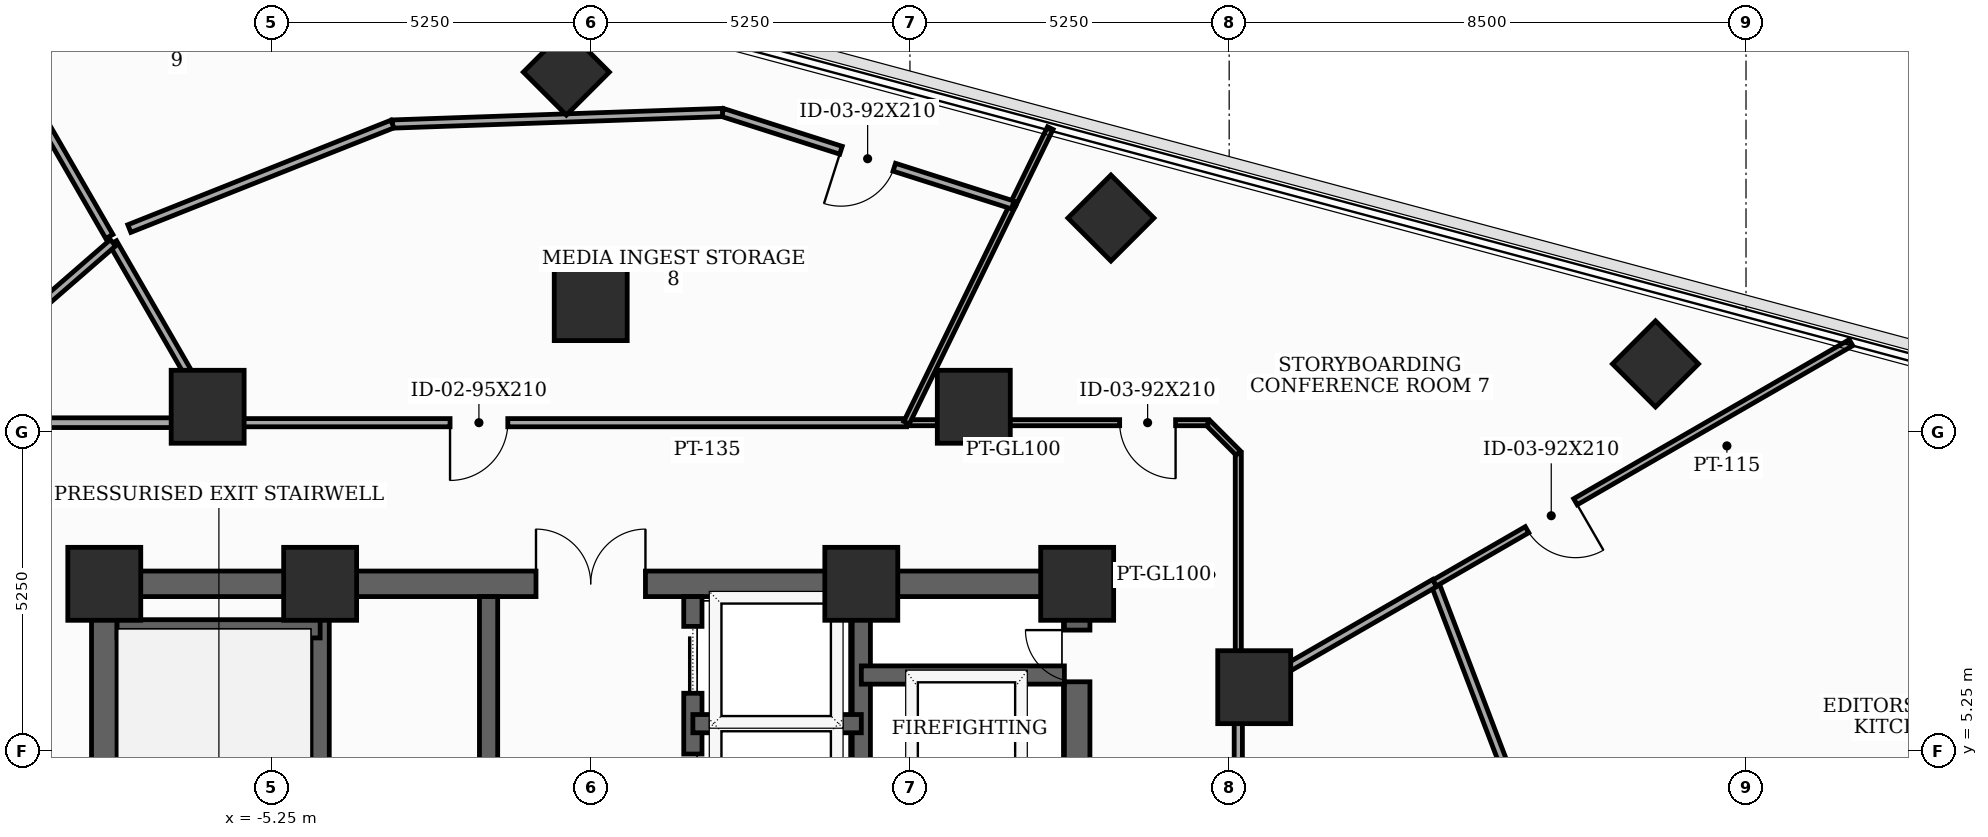
"""IFC4 building model, lengths in metres.
Left out: names, types, materials, properties, quantities, classifications, styles, units other than length and angle.
Written with IfcOpenShell. Run it as: python <this file> out.ifc"""

import sys

from ifc_helpers import new_model, si_unit, direction, frame, frame_2d, origin, origin_2d, place, context, subcontext, project, spatial, rectangle, extrude, element, fill, save


model = new_model("IFC4")
c1 = context("Model", 3, precision=1e-05, world=origin(), true_north=direction((0.0, 1.0)))
c2 = subcontext(c1, "Body", "Model", "MODEL_VIEW")
j1 = project(units=[si_unit("LENGTHUNIT", "METRE"), si_unit("PLANEANGLEUNIT", "RADIAN")], contexts=[c1])
p1 = place(None, origin())
s1 = spatial("IfcSite", under=j1, at=p1, CompositionType="ELEMENT")
p2 = place(p1, origin())
s2 = spatial("IfcBuilding", under=s1, at=p2, CompositionType="ELEMENT")
p3 = place(p2, frame((0.0, 0.0, 206.4)))
s3 = spatial("IfcBuildingStorey", under=s2, at=p3, CompositionType="ELEMENT", Elevation=206.4)
for number, where, z_axis, x_axis in (
    (1, (8.0, 8.0, 0.0), (0.0, 0.0, 1.0), (1.0, 0.0, 0.0)),
    (2, (4.45, 8.0, 0.0), (0.0, 0.0, 1.0), (1.0, 0.0, 0.0)),
    (3, (-4.45, 8.0, 0.0), (0.0, 0.0, 1.0), (1.0, 0.0, 0.0)),
    (4, (-8.0, 8.0, 0.0), (0.0, 0.0, 1.0), (1.0, 0.0, 0.0)),
    (5, (10.912, 6.3, 0.0), (0.0, 0.0, 1.0), (1.0, 0.0, 0.0)),
    (6, (6.3, 10.912, 0.0), (0.0, 0.0, 1.0), (1.0, 0.0, 0.0)),
    (7, (0.0, 12.6, 0.0), (0.0, 0.0, 1.0), (1.0, 0.0, 0.0)),
    (8, (-6.3, 10.912, 0.0), (0.0, 0.0, 1.0), (1.0, 0.0, 0.0)),
):
    element("IfcColumn", number, at=place(p3, frame(where, z_axis=z_axis, x_axis=x_axis)), inside=s3, PredefinedType="COLUMN", context=c2, shape_type="SweptSolid", body=[
        extrude(rectangle(XDim=1.2, YDim=1.2, at=origin_2d()), origin(), (0.0, 0.0, 1.0), 3.7),
    ])
for number, where, z_axis, x_axis in (
    (9, (17.511, 11.616, 0.0), (0.0, 0.0, 1.0), (0.707, 0.707, 0.0)),
    (10, (8.555, 14.016, 0.0), (0.0, 0.0, 1.0), (0.707, 0.707, 0.0)),
    (11, (-0.401, 16.416, 0.0), (0.0, 0.0, 1.0), (0.707, 0.707, 0.0)),
):
    element("IfcColumn", number, at=place(p3, frame(where, z_axis=z_axis, x_axis=x_axis)), inside=s3, PredefinedType="COLUMN", context=c2, shape_type="SweptSolid", body=[
        extrude(rectangle(XDim=1.0, YDim=1.0, at=origin_2d()), origin(), (0.0, 0.0, 1.0), 3.7),
    ])
p4 = place(p3, frame((-8.0, -8.0, 0.0), z_axis=(0.0, 0.0, 1.0), x_axis=(0.0, 1.0, 0.0)))
e12 = element("IfcWall", 12, at=p4, inside=s3, PredefinedType="SHEAR", context=c2, shape_type="SweptSolid", body=[
    extrude(rectangle(XDim=16.0, YDim=0.42, at=frame_2d((8.0, 0.0))), origin(), (0.0, 0.0, 1.0), 3.5),
])
p5 = place(p4, frame((0.761, 0.0, 0.0)))
e13 = element("IfcOpeningElement", 13, at=p5, cuts=e12, PredefinedType="OPENING", context=c2, shape_type="SweptSolid", body=[
    extrude(rectangle(XDim=0.85, YDim=2.02, at=frame_2d((0.425, 1.01))), frame((0.0, 0.22, 0.0), z_axis=(0.0, -1.0, 0.0), x_axis=(1.0, 0.0, 0.0)), (0.0, 0.0, 1.0), 0.44),
])
p6 = place(p4, frame((5.35, 0.0, 0.0)))
e14 = element("IfcOpeningElement", 14, at=p6, cuts=e12, PredefinedType="OPENING", context=c2, shape_type="SweptSolid", body=[
    extrude(rectangle(XDim=1.05, YDim=2.15, at=frame_2d((0.525, 1.075))), frame((0.0, 0.22, 0.0), z_axis=(0.0, -1.0, 0.0), x_axis=(1.0, 0.0, 0.0)), (0.0, 0.0, 1.0), 0.44),
])
p7 = place(p3, frame((8.0, -8.0, 0.0), z_axis=(0.0, 0.0, 1.0), x_axis=(0.0, 1.0, 0.0)))
e15 = element("IfcWall", 15, at=p7, inside=s3, PredefinedType="SHEAR", context=c2, shape_type="SweptSolid", body=[
    extrude(rectangle(XDim=16.0, YDim=0.42, at=frame_2d((8.0, 0.0))), origin(), (0.0, 0.0, 1.0), 3.5),
])
p8 = place(p7, frame((9.6, 0.0, 0.0)))
e16 = element("IfcOpeningElement", 16, at=p8, cuts=e15, PredefinedType="OPENING", context=c2, shape_type="SweptSolid", body=[
    extrude(rectangle(XDim=1.05, YDim=2.15, at=frame_2d((0.525, 1.075))), frame((0.0, 0.22, 0.0), z_axis=(0.0, -1.0, 0.0), x_axis=(1.0, 0.0, 0.0)), (0.0, 0.0, 1.0), 0.44),
])
p9 = place(p7, frame((14.389, 0.0, 0.0)))
e17 = element("IfcOpeningElement", 17, at=p9, cuts=e15, PredefinedType="OPENING", context=c2, shape_type="SweptSolid", body=[
    extrude(rectangle(XDim=0.85, YDim=2.02, at=frame_2d((0.425, 1.01))), frame((0.0, 0.22, 0.0), z_axis=(0.0, -1.0, 0.0), x_axis=(1.0, 0.0, 0.0)), (0.0, 0.0, 1.0), 0.44),
])
p10 = place(p3, frame((-8.0, 8.0, 0.0), z_axis=(0.0, 0.0, 1.0), x_axis=(1.0, 0.0, 0.0)))
e18 = element("IfcWall", 18, at=p10, inside=s3, PredefinedType="SHEAR", context=c2, shape_type="SweptSolid", body=[
    extrude(rectangle(XDim=16.0, YDim=0.42, at=frame_2d((8.0, 0.0))), origin(), (0.0, 0.0, 1.0), 3.5),
])
p11 = place(p10, frame((7.1, 0.0, 0.0)))
e19 = element("IfcOpeningElement", 19, at=p11, cuts=e18, PredefinedType="OPENING", context=c2, shape_type="SweptSolid", body=[
    extrude(rectangle(XDim=1.8, YDim=2.15, at=frame_2d((0.9, 1.075))), frame((0.0, 0.22, 0.0), z_axis=(0.0, -1.0, 0.0), x_axis=(1.0, 0.0, 0.0)), (0.0, 0.0, 1.0), 0.44),
])
for number, where, z_axis, x_axis in (
    (20, (-4.45, -7.79, 0.0), (0.0, 0.0, 1.0), (0.0, 1.0, 0.0)),
    (21, (4.45, -7.79, 0.0), (0.0, 0.0, 1.0), (0.0, 1.0, 0.0)),
):
    element("IfcWall", number, at=place(p3, frame(where, z_axis=z_axis, x_axis=x_axis)), inside=s3, PredefinedType="SHEAR", context=c2, shape_type="SweptSolid", body=[
        extrude(rectangle(XDim=15.58, YDim=0.3, at=frame_2d((7.79, 0.0))), origin(), (0.0, 0.0, 1.0), 3.5),
    ])
for number, where, z_axis, x_axis in (
    (22, (-7.79, 7.26, 0.0), (0.0, 0.0, 1.0), (1.0, 0.0, 0.0)),
    (23, (4.45, 6.5, 0.0), (0.0, 0.0, 1.0), (1.0, 0.0, 0.0)),
):
    element("IfcWall", number, at=place(p3, frame(where, z_axis=z_axis, x_axis=x_axis)), inside=s3, PredefinedType="SHEAR", context=c2, shape_type="SweptSolid", body=[
        extrude(rectangle(XDim=3.34, YDim=0.3, at=frame_2d((1.67, 0.0))), origin(), (0.0, 0.0, 1.0), 3.5),
    ])
p12 = place(p3, frame((-1.68, -4.85, 0.0), z_axis=(0.0, 0.0, 1.0), x_axis=(0.0, 1.0, 0.0)))
e24 = element("IfcWall", 24, at=p12, inside=s3, PredefinedType="SHEAR", context=c2, shape_type="SweptSolid", body=[
    extrude(rectangle(XDim=12.64, YDim=0.3, at=frame_2d((6.32, 0.0))), origin(), (0.0, 0.0, 1.0), 3.5),
])
p13 = place(p12, frame((1.05, 0.0, 0.0)))
e25 = element("IfcOpeningElement", 25, at=p13, cuts=e24, PredefinedType="OPENING", context=c2, shape_type="SweptSolid", body=[
    extrude(rectangle(XDim=0.85, YDim=2.02, at=frame_2d((0.425, 1.01))), frame((0.0, 0.16, 0.0), z_axis=(0.0, -1.0, 0.0), x_axis=(1.0, 0.0, 0.0)), (0.0, 0.0, 1.0), 0.32),
])
p14 = place(p12, frame((6.8, 0.0, 0.0)))
e26 = element("IfcOpeningElement", 26, at=p14, cuts=e24, PredefinedType="OPENING", context=c2, shape_type="SweptSolid", body=[
    extrude(rectangle(XDim=0.95, YDim=2.1, at=frame_2d((0.475, 1.05))), frame((0.0, 0.16, 0.0), z_axis=(0.0, -1.0, 0.0), x_axis=(1.0, 0.0, 0.0)), (0.0, 0.0, 1.0), 0.32),
])
p15 = place(p3, frame((1.68, -4.85, 0.0), z_axis=(0.0, 0.0, 1.0), x_axis=(0.0, 1.0, 0.0)))
e27 = element("IfcWall", 27, at=p15, inside=s3, PredefinedType="SHEAR", context=c2, shape_type="SweptSolid", body=[
    extrude(rectangle(XDim=12.64, YDim=0.3, at=frame_2d((6.32, 0.0))), origin(), (0.0, 0.0, 1.0), 3.5),
])
p16 = place(p15, frame((0.55, 0.0, 0.0)))
e28 = element("IfcOpeningElement", 28, at=p16, cuts=e27, PredefinedType="OPENING", context=c2, shape_type="SweptSolid", body=[
    extrude(rectangle(XDim=1.1, YDim=2.1, at=frame_2d((0.55, 1.05))), frame((0.0, 0.16, 0.0), z_axis=(0.0, -1.0, 0.0), x_axis=(1.0, 0.0, 0.0)), (0.0, 0.0, 1.0), 0.32),
])
p17 = place(p15, frame((2.65, 0.0, 0.0)))
e29 = element("IfcOpeningElement", 29, at=p17, cuts=e27, PredefinedType="OPENING", context=c2, shape_type="SweptSolid", body=[
    extrude(rectangle(XDim=1.1, YDim=2.1, at=frame_2d((0.55, 1.05))), frame((0.0, 0.16, 0.0), z_axis=(0.0, -1.0, 0.0), x_axis=(1.0, 0.0, 0.0)), (0.0, 0.0, 1.0), 0.32),
])
p18 = place(p15, frame((4.75, 0.0, 0.0)))
e30 = element("IfcOpeningElement", 30, at=p18, cuts=e27, PredefinedType="OPENING", context=c2, shape_type="SweptSolid", body=[
    extrude(rectangle(XDim=1.1, YDim=2.1, at=frame_2d((0.55, 1.05))), frame((0.0, 0.16, 0.0), z_axis=(0.0, -1.0, 0.0), x_axis=(1.0, 0.0, 0.0)), (0.0, 0.0, 1.0), 0.32),
])
p19 = place(p15, frame((6.85, 0.0, 0.0)))
e31 = element("IfcOpeningElement", 31, at=p19, cuts=e27, PredefinedType="OPENING", context=c2, shape_type="SweptSolid", body=[
    extrude(rectangle(XDim=1.1, YDim=2.1, at=frame_2d((0.55, 1.05))), frame((0.0, 0.16, 0.0), z_axis=(0.0, -1.0, 0.0), x_axis=(1.0, 0.0, 0.0)), (0.0, 0.0, 1.0), 0.32),
])
p20 = place(p15, frame((8.95, 0.0, 0.0)))
e32 = element("IfcOpeningElement", 32, at=p20, cuts=e27, PredefinedType="OPENING", context=c2, shape_type="SweptSolid", body=[
    extrude(rectangle(XDim=1.1, YDim=2.1, at=frame_2d((0.55, 1.05))), frame((0.0, 0.16, 0.0), z_axis=(0.0, -1.0, 0.0), x_axis=(1.0, 0.0, 0.0)), (0.0, 0.0, 1.0), 0.32),
])
p21 = place(p15, frame((11.05, 0.0, 0.0)))
e33 = element("IfcOpeningElement", 33, at=p21, cuts=e27, PredefinedType="OPENING", context=c2, shape_type="SweptSolid", body=[
    extrude(rectangle(XDim=1.1, YDim=2.1, at=frame_2d((0.55, 1.05))), frame((0.0, 0.16, 0.0), z_axis=(0.0, -1.0, 0.0), x_axis=(1.0, 0.0, 0.0)), (0.0, 0.0, 1.0), 0.32),
])
p22 = place(p3, frame((1.68, 5.7, 0.0), z_axis=(0.0, 0.0, 1.0), x_axis=(1.0, 0.0, 0.0)))
e34 = element("IfcWall", 34, at=p22, inside=s3, PredefinedType="SHEAR", context=c2, shape_type="SweptSolid", body=[
    extrude(rectangle(XDim=2.77, YDim=0.3, at=frame_2d((1.385, 0.0))), origin(), (0.0, 0.0, 1.0), 3.5),
])
p23 = place(p3, frame((10.65, -10.15, 0.0), z_axis=(0.0, 0.0, 1.0), x_axis=(0.0, 1.0, 0.0)))
e35 = element("IfcWall", 35, at=p23, inside=s3, PredefinedType="PARTITIONING", context=c2, shape_type="SweptSolid", body=[
    extrude(rectangle(XDim=16.299, YDim=0.135, at=frame_2d((8.149, 0.0))), origin(), (0.0, 0.0, 1.0), 2.885),
])
p24 = place(p23, frame((7.675, 0.0, 0.0)))
e36 = element("IfcOpeningElement", 36, at=p24, cuts=e35, PredefinedType="OPENING", context=c2, shape_type="SweptSolid", body=[
    extrude(rectangle(XDim=0.95, YDim=2.1, at=frame_2d((0.475, 1.05))), frame((0.0, 0.077, 0.0), z_axis=(0.0, -1.0, 0.0), x_axis=(1.0, 0.0, 0.0)), (0.0, 0.0, 1.0), 0.155),
])
p25 = place(p3, frame((10.65, 6.149, 0.0), z_axis=(0.0, 0.0, 1.0), x_axis=(0.0, 1.0, 0.0)))
e37 = element("IfcWall", 37, at=p25, inside=s3, PredefinedType="MOVABLE", context=c2, shape_type="SweptSolid", body=[
    extrude(rectangle(XDim=4.001, YDim=0.1, at=frame_2d((2.0, 0.0))), origin(), (0.0, 0.0, 1.0), 2.885),
])
p26 = place(p3, frame((10.65, 10.15, 0.0), z_axis=(0.0, 0.0, 1.0), x_axis=(-0.707106781187, 0.707106781187, 0.0)))
e38 = element("IfcWall", 38, at=p26, inside=s3, PredefinedType="MOVABLE", context=c2, shape_type="SweptSolid", body=[
    extrude(rectangle(XDim=0.707, YDim=0.1, at=frame_2d((0.354, 0.0))), origin(), (0.0, 0.0, 1.0), 3.5),
])
p27 = place(p3, frame((10.15, 10.65, 0.0), z_axis=(0.0, 0.0, 1.0), x_axis=(-1.0, 0.0, 0.0)))
e39 = element("IfcWall", 39, at=p27, inside=s3, PredefinedType="MOVABLE", context=c2, shape_type="SweptSolid", body=[
    extrude(rectangle(XDim=4.956, YDim=0.1, at=frame_2d((2.478, 0.0))), origin(), (0.0, 0.0, 1.0), 2.885),
])
p28 = place(p27, frame((0.531, 0.0, 0.0)))
e40 = element("IfcOpeningElement", 40, at=p28, cuts=e39, PredefinedType="OPENING", context=c2, shape_type="SweptSolid", body=[
    extrude(rectangle(XDim=0.92, YDim=2.1, at=frame_2d((0.46, 1.05))), frame((0.0, 0.06, 0.0), z_axis=(0.0, -1.0, 0.0), x_axis=(1.0, 0.0, 0.0)), (0.0, 0.0, 1.0), 0.12),
])
p29 = place(p3, frame((5.194, 10.65, 0.0), z_axis=(0.0, 0.0, 1.0), x_axis=(-1.0, 0.0, 0.0)))
e41 = element("IfcWall", 41, at=p29, inside=s3, PredefinedType="PARTITIONING", context=c2, shape_type="SweptSolid", body=[
    extrude(rectangle(XDim=11.343, YDim=0.135, at=frame_2d((5.671, 0.0))), origin(), (0.0, 0.0, 1.0), 2.885),
])
p30 = place(p29, frame((6.558, 0.0, 0.0)))
e42 = element("IfcOpeningElement", 42, at=p30, cuts=e41, PredefinedType="OPENING", context=c2, shape_type="SweptSolid", body=[
    extrude(rectangle(XDim=0.95, YDim=2.1, at=frame_2d((0.475, 1.05))), frame((0.0, 0.077, 0.0), z_axis=(0.0, -1.0, 0.0), x_axis=(1.0, 0.0, 0.0)), (0.0, 0.0, 1.0), 0.155),
])
p31 = place(p3, frame((-6.149, 10.65, 0.0), z_axis=(0.0, 0.0, 1.0), x_axis=(-1.0, 0.0, 0.0)))
e43 = element("IfcWall", 43, at=p31, inside=s3, PredefinedType="PARTITIONING", context=c2, shape_type="SweptSolid", body=[
    extrude(rectangle(XDim=4.001, YDim=0.16, at=frame_2d((2.0, 0.0))), origin(), (0.0, 0.0, 1.0), 2.885),
])
p32 = place(p3, frame((15.843, 2.865, 0.0), z_axis=(0.0, 0.0, 1.0), x_axis=(-0.356314091201, 0.934366238908, 0.0)))
e44 = element("IfcWall", 44, at=p32, inside=s3, PredefinedType="PARTITIONING", context=c2, shape_type="SweptSolid", body=[
    extrude(rectangle(XDim=5.51, YDim=0.135, at=frame_2d((2.755, 0.0))), origin(), (0.0, 0.0, 1.0), 3.5),
])
p33 = place(p3, frame((13.88, 8.013, 0.0), z_axis=(0.0, 0.0, 1.0), x_axis=(-0.866120184914, -0.499835798323, 0.0)))
e45 = element("IfcWall", 45, at=p33, inside=s3, PredefinedType="PARTITIONING", context=c2, shape_type="SweptSolid", body=[
    extrude(rectangle(XDim=3.729, YDim=0.135, at=frame_2d((1.865, 0.0))), origin(), (0.0, 0.0, 1.0), 2.885),
])
p34 = place(p3, frame((20.726, 11.966, 0.0), z_axis=(0.0, 0.0, 1.0), x_axis=(-0.865993758931, -0.500054806489, 0.0)))
e46 = element("IfcWall", 46, at=p34, inside=s3, PredefinedType="PARTITIONING", context=c2, shape_type="SweptSolid", body=[
    extrude(rectangle(XDim=7.906, YDim=0.115, at=frame_2d((3.953, 0.0))), origin(), (0.0, 0.0, 1.0), 2.985),
])
p35 = place(p34, frame((5.232, 0.0, 0.0)))
e47 = element("IfcOpeningElement", 47, at=p35, cuts=e46, PredefinedType="OPENING", context=c2, shape_type="SweptSolid", body=[
    extrude(rectangle(XDim=0.92, YDim=2.1, at=frame_2d((0.46, 1.05))), frame((0.0, 0.067, 0.0), z_axis=(0.0, -1.0, 0.0), x_axis=(1.0, 0.0, 0.0)), (0.0, 0.0, 1.0), 0.135),
])
p36 = place(p3, frame((6.941, 14.231, 0.0), z_axis=(0.0, 0.0, 1.0), x_axis=(-0.43841759586, -0.898771390088, 0.0)))
e48 = element("IfcWall", 48, at=p36, inside=s3, PredefinedType="MOVABLE", context=c2, shape_type="SweptSolid", body=[
    extrude(rectangle(XDim=3.984, YDim=0.1, at=frame_2d((1.992, 0.0))), origin(), (0.0, 0.0, 1.0), 2.885),
])
p37 = place(p3, frame((7.558, 15.495, 0.0), z_axis=(0.0, 0.0, 1.0), x_axis=(-0.438792927977, -0.898588207333, 0.0)))
e49 = element("IfcWall", 49, at=p37, inside=s3, PredefinedType="MOVABLE", context=c2, shape_type="SweptSolid", body=[
    extrude(rectangle(XDim=1.406, YDim=0.1, at=frame_2d((0.703, 0.0))), origin(), (0.0, 0.0, 1.0), 2.985),
])
p38 = place(p3, frame((6.941, 14.231, 0.0), z_axis=(0.0, 0.0, 1.0), x_axis=(-0.952809240113, 0.303569682208, 0.0)))
e50 = element("IfcWall", 50, at=p38, inside=s3, PredefinedType="PARTITIONING", context=c2, shape_type="SweptSolid", body=[
    extrude(rectangle(XDim=5.01, YDim=0.135, at=frame_2d((2.505, 0.0))), origin(), (0.0, 0.0, 1.0), 2.985),
])
p39 = place(p38, frame((2.045, 0.0, 0.0)))
e51 = element("IfcOpeningElement", 51, at=p39, cuts=e50, PredefinedType="OPENING", context=c2, shape_type="SweptSolid", body=[
    extrude(rectangle(XDim=0.92, YDim=2.1, at=frame_2d((0.46, 1.05))), frame((0.0, 0.077, 0.0), z_axis=(0.0, -1.0, 0.0), x_axis=(1.0, 0.0, 0.0)), (0.0, 0.0, 1.0), 0.155),
])
p40 = place(p3, frame((2.167, 15.752, 0.0), z_axis=(0.0, 0.0, 1.0), x_axis=(-0.999388305695, -0.034971623345, 0.0)))
e52 = element("IfcWall", 52, at=p40, inside=s3, PredefinedType="PARTITIONING", context=c2, shape_type="SweptSolid", body=[
    extrude(rectangle(XDim=5.431, YDim=0.135, at=frame_2d((2.716, 0.0))), origin(), (0.0, 0.0, 1.0), 2.985),
])
p41 = place(p3, frame((-3.261, 15.562, 0.0), z_axis=(0.0, 0.0, 1.0), x_axis=(-0.929345677851, -0.369210794885, 0.0)))
e53 = element("IfcWall", 53, at=p41, inside=s3, PredefinedType="PARTITIONING", context=c2, shape_type="SweptSolid", body=[
    extrude(rectangle(XDim=4.656, YDim=0.135, at=frame_2d((2.328, 0.0))), origin(), (0.0, 0.0, 1.0), 2.985),
])
p42 = place(p3, frame((-7.857, 13.609, 0.0), z_axis=(0.0, 0.0, 1.0), x_axis=(0.499920397431, -0.866071357471, 0.0)))
e54 = element("IfcWall", 54, at=p42, inside=s3, PredefinedType="PARTITIONING", context=c2, shape_type="SweptSolid", body=[
    extrude(rectangle(XDim=3.417, YDim=0.135, at=frame_2d((1.708, 0.0))), origin(), (0.0, 0.0, 1.0), 2.885),
])
p43 = place(p3, frame((-11.967, 20.726, 0.0), z_axis=(0.0, 0.0, 1.0), x_axis=(0.499980770555, -0.866036505625, 0.0)))
e55 = element("IfcWall", 55, at=p43, inside=s3, PredefinedType="PARTITIONING", context=c2, shape_type="SweptSolid", body=[
    extrude(rectangle(XDim=8.099, YDim=0.135, at=frame_2d((4.05, 0.0))), origin(), (0.0, 0.0, 1.0), 2.985),
])
p44 = place(p3, frame((-12.701, 9.398, 0.0), z_axis=(0.0, 0.0, 1.0), x_axis=(0.754700505452, 0.656069468174, 0.0)))
e56 = element("IfcWall", 56, at=p44, inside=s3, PredefinedType="PARTITIONING", context=c2, shape_type="SweptSolid", body=[
    extrude(rectangle(XDim=6.418, YDim=0.135, at=frame_2d((3.209, 0.0))), origin(), (0.0, 0.0, 1.0), 3.5),
])
p45 = place(p9, origin())
e57 = element("IfcDoor", 57, at=p45, inside=s3, OperationType="SINGLE_SWING_RIGHT", PredefinedType="TRAPDOOR", context=c2, shape_type="SweptSolid", body=[
    extrude(rectangle(XDim=0.85, YDim=2.02, at=frame_2d((0.425, 1.01))), frame((0.0, 0.025, 0.0), z_axis=(0.0, -1.0, 0.0), x_axis=(1.0, 0.0, 0.0)), (0.0, 0.0, 1.0), 0.05),
])
fill(e17, e57)
p46 = place(p11, origin())
e58 = element("IfcDoor", 58, at=p46, inside=s3, OperationType="DOUBLE_DOOR_SINGLE_SWING", PredefinedType="DOOR", context=c2, shape_type="SweptSolid", body=[
    extrude(rectangle(XDim=1.8, YDim=2.15, at=frame_2d((0.9, 1.075))), frame((0.0, 0.025, 0.0), z_axis=(0.0, -1.0, 0.0), x_axis=(1.0, 0.0, 0.0)), (0.0, 0.0, 1.0), 0.05),
])
fill(e19, e58)
p47 = place(p20, origin())
e59 = element("IfcDoor", 59, at=p47, inside=s3, OperationType="SLIDING_TO_LEFT", PredefinedType="DOOR", context=c2, shape_type="SweptSolid", body=[
    extrude(rectangle(XDim=1.1, YDim=2.1, at=frame_2d((0.55, 1.05))), frame((0.0, 0.025, 0.0), z_axis=(0.0, -1.0, 0.0), x_axis=(1.0, 0.0, 0.0)), (0.0, 0.0, 1.0), 0.05),
])
fill(e32, e59)
p48 = place(p21, origin())
e60 = element("IfcDoor", 60, at=p48, inside=s3, OperationType="SLIDING_TO_LEFT", PredefinedType="DOOR", context=c2, shape_type="SweptSolid", body=[
    extrude(rectangle(XDim=1.1, YDim=2.1, at=frame_2d((0.55, 1.05))), frame((0.0, 0.025, 0.0), z_axis=(0.0, -1.0, 0.0), x_axis=(1.0, 0.0, 0.0)), (0.0, 0.0, 1.0), 0.05),
])
fill(e33, e60)
p49 = place(p28, origin())
e61 = element("IfcDoor", 61, at=p49, inside=s3, OperationType="SINGLE_SWING_LEFT", PredefinedType="DOOR", context=c2, shape_type="SweptSolid", body=[
    extrude(rectangle(XDim=0.92, YDim=2.1, at=frame_2d((0.46, 1.05))), frame((0.0, 0.025, 0.0), z_axis=(0.0, -1.0, 0.0), x_axis=(1.0, 0.0, 0.0)), (0.0, 0.0, 1.0), 0.05),
])
fill(e40, e61)
p50 = place(p30, origin())
e62 = element("IfcDoor", 62, at=p50, inside=s3, OperationType="SINGLE_SWING_RIGHT", PredefinedType="DOOR", context=c2, shape_type="SweptSolid", body=[
    extrude(rectangle(XDim=0.95, YDim=2.1, at=frame_2d((0.475, 1.05))), frame((0.0, 0.025, 0.0), z_axis=(0.0, -1.0, 0.0), x_axis=(1.0, 0.0, 0.0)), (0.0, 0.0, 1.0), 0.05),
])
fill(e42, e62)
p51 = place(p35, origin())
e63 = element("IfcDoor", 63, at=p51, inside=s3, OperationType="SINGLE_SWING_LEFT", PredefinedType="DOOR", context=c2, shape_type="SweptSolid", body=[
    extrude(rectangle(XDim=0.92, YDim=2.1, at=frame_2d((0.46, 1.05))), frame((0.0, 0.025, 0.0), z_axis=(0.0, -1.0, 0.0), x_axis=(1.0, 0.0, 0.0)), (0.0, 0.0, 1.0), 0.05),
])
fill(e47, e63)
p52 = place(p39, origin())
e64 = element("IfcDoor", 64, at=p52, inside=s3, OperationType="SINGLE_SWING_RIGHT", PredefinedType="DOOR", context=c2, shape_type="SweptSolid", body=[
    extrude(rectangle(XDim=0.92, YDim=2.1, at=frame_2d((0.46, 1.05))), frame((0.0, 0.025, 0.0), z_axis=(0.0, -1.0, 0.0), x_axis=(1.0, 0.0, 0.0)), (0.0, 0.0, 1.0), 0.05),
])
fill(e51, e64)
save(model, sys.argv[1])
